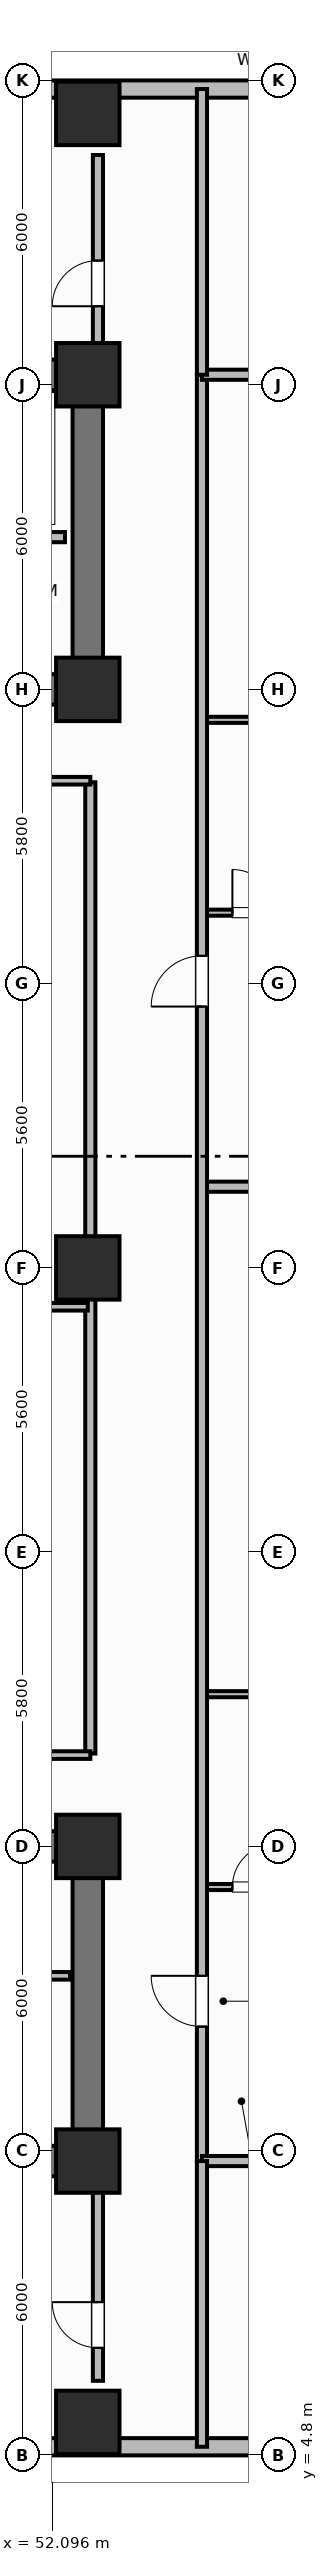
"""IFC4 building model, lengths in metres.
Left out: names, types, materials, properties, quantities, classifications, styles, units other than length and angle.
Written with IfcOpenShell. Run it as: python <this file> out.ifc"""

import sys

from ifc_helpers import new_model, si_unit, direction, frame, frame_2d, origin, origin_2d, place, context, subcontext, project, spatial, rectangle, extrude, element, fill, save


model = new_model("IFC4")
c1 = context("Model", 3, precision=1e-05, world=origin(), true_north=direction((0.0, 1.0)))
c2 = subcontext(c1, "Body", "Model", "MODEL_VIEW")
j1 = project(units=[si_unit("LENGTHUNIT", "METRE"), si_unit("PLANEANGLEUNIT", "RADIAN")], contexts=[c1])
p1 = place(None, origin())
s1 = spatial("IfcSite", under=j1, at=p1, CompositionType="ELEMENT")
p2 = place(p1, origin())
s2 = spatial("IfcBuilding", under=s1, at=p2, CompositionType="ELEMENT")
p3 = place(p2, frame((0.0, 0.0, 51.0)))
s3 = spatial("IfcBuildingStorey", under=s2, at=p3, CompositionType="ELEMENT", Elevation=51.0)
p4 = place(p3, frame((52.8, 10.6, 0.0), z_axis=(0.0, 0.0, 1.0), x_axis=(-1.0, 0.0, 0.0)))
e1 = element("IfcWall", 1, at=p4, inside=s3, PredefinedType="SHEAR", context=c2, shape_type="SweptSolid", body=[
    extrude(rectangle(XDim=27.2, YDim=0.6, at=frame_2d((13.6, 0.0))), origin(), (0.0, 0.0, 1.0), 3.7),
])
p5 = place(p3, frame((52.8, 10.9, 0.0), z_axis=(0.0, 0.0, 1.0), x_axis=(0.0, 1.0, 0.0)))
e2 = element("IfcWall", 2, at=p5, inside=s3, PredefinedType="SHEAR", context=c2, shape_type="SweptSolid", body=[
    extrude(rectangle(XDim=5.6, YDim=0.6, at=frame_2d((2.8, 0.0))), origin(), (0.0, 0.0, 1.0), 3.7),
])
p6 = place(p3, frame((25.6, 16.8, 0.0), z_axis=(0.0, 0.0, 1.0), x_axis=(1.0, 0.0, 0.0)))
e3 = element("IfcWall", 3, at=p6, inside=s3, PredefinedType="SHEAR", context=c2, shape_type="SweptSolid", body=[
    extrude(rectangle(XDim=27.2, YDim=0.6, at=frame_2d((13.6, 0.0))), origin(), (0.0, 0.0, 1.0), 3.7),
])
p7 = place(p6, frame((1.8, 0.0, 0.0)))
e4 = element("IfcOpeningElement", 4, at=p7, cuts=e3, PredefinedType="OPENING", context=c2, shape_type="SweptSolid", body=[
    extrude(rectangle(XDim=1.1, YDim=2.15, at=frame_2d((0.55, 1.075))), frame((0.0, 0.31, 0.0), z_axis=(0.0, -1.0, 0.0), x_axis=(1.0, 0.0, 0.0)), (0.0, 0.0, 1.0), 0.62),
])
p8 = place(p6, frame((5.6, 0.0, 0.0)))
e5 = element("IfcOpeningElement", 5, at=p8, cuts=e3, PredefinedType="OPENING", context=c2, shape_type="SweptSolid", body=[
    extrude(rectangle(XDim=0.85, YDim=2.1, at=frame_2d((0.425, 1.05))), frame((0.0, 0.31, 0.0), z_axis=(0.0, -1.0, 0.0), x_axis=(1.0, 0.0, 0.0)), (0.0, 0.0, 1.0), 0.62),
])
p9 = place(p6, frame((13.0, 0.0, 0.0)))
e6 = element("IfcOpeningElement", 6, at=p9, cuts=e3, PredefinedType="OPENING", context=c2, shape_type="SweptSolid", body=[
    extrude(rectangle(XDim=1.2, YDim=2.15, at=frame_2d((0.6, 1.075))), frame((0.0, 0.31, 0.0), z_axis=(0.0, -1.0, 0.0), x_axis=(1.0, 0.0, 0.0)), (0.0, 0.0, 1.0), 0.62),
])
p10 = place(p6, frame((20.4, 0.0, 0.0)))
e7 = element("IfcOpeningElement", 7, at=p10, cuts=e3, PredefinedType="OPENING", context=c2, shape_type="SweptSolid", body=[
    extrude(rectangle(XDim=1.3, YDim=2.2, at=frame_2d((0.65, 1.1))), frame((0.0, 0.31, 0.0), z_axis=(0.0, -1.0, 0.0), x_axis=(1.0, 0.0, 0.0)), (0.0, 0.0, 1.0), 0.62),
])
p11 = place(p6, frame((24.65, 0.0, 0.0)))
e8 = element("IfcOpeningElement", 8, at=p11, cuts=e3, PredefinedType="OPENING", context=c2, shape_type="SweptSolid", body=[
    extrude(rectangle(XDim=0.85, YDim=2.1, at=frame_2d((0.425, 1.05))), frame((0.0, 0.31, 0.0), z_axis=(0.0, -1.0, 0.0), x_axis=(1.0, 0.0, 0.0)), (0.0, 0.0, 1.0), 0.62),
])
p12 = place(p3, frame((25.6, 45.8, 0.0), z_axis=(0.0, 0.0, 1.0), x_axis=(1.0, 0.0, 0.0)))
e9 = element("IfcWall", 9, at=p12, inside=s3, PredefinedType="SHEAR", context=c2, shape_type="SweptSolid", body=[
    extrude(rectangle(XDim=27.2, YDim=0.6, at=frame_2d((13.6, 0.0))), origin(), (0.0, 0.0, 1.0), 3.7),
])
p13 = place(p3, frame((52.8, 39.9, 0.0), z_axis=(0.0, 0.0, 1.0), x_axis=(0.0, 1.0, 0.0)))
e10 = element("IfcWall", 10, at=p13, inside=s3, PredefinedType="SHEAR", context=c2, shape_type="SweptSolid", body=[
    extrude(rectangle(XDim=5.6, YDim=0.6, at=frame_2d((2.8, 0.0))), origin(), (0.0, 0.0, 1.0), 3.7),
])
p14 = place(p3, frame((52.8, 39.6, 0.0), z_axis=(0.0, 0.0, 1.0), x_axis=(-1.0, 0.0, 0.0)))
e11 = element("IfcWall", 11, at=p14, inside=s3, PredefinedType="SHEAR", context=c2, shape_type="SweptSolid", body=[
    extrude(rectangle(XDim=27.2, YDim=0.6, at=frame_2d((13.6, 0.0))), origin(), (0.0, 0.0, 1.0), 3.7),
])
p15 = place(p14, frame((24.2, 0.0, 0.0)))
e12 = element("IfcOpeningElement", 12, at=p15, cuts=e11, PredefinedType="OPENING", context=c2, shape_type="SweptSolid", body=[
    extrude(rectangle(XDim=1.1, YDim=2.15, at=frame_2d((0.55, 1.075))), frame((0.0, 0.31, 0.0), z_axis=(0.0, -1.0, 0.0), x_axis=(1.0, 0.0, 0.0)), (0.0, 0.0, 1.0), 0.62),
])
p16 = place(p14, frame((20.55, 0.0, 0.0)))
e13 = element("IfcOpeningElement", 13, at=p16, cuts=e11, PredefinedType="OPENING", context=c2, shape_type="SweptSolid", body=[
    extrude(rectangle(XDim=0.95, YDim=2.1, at=frame_2d((0.475, 1.05))), frame((0.0, 0.31, 0.0), z_axis=(0.0, -1.0, 0.0), x_axis=(1.0, 0.0, 0.0)), (0.0, 0.0, 1.0), 0.62),
])
p17 = place(p14, frame((15.1, 0.0, 0.0)))
e14 = element("IfcOpeningElement", 14, at=p17, cuts=e11, PredefinedType="OPENING", context=c2, shape_type="SweptSolid", body=[
    extrude(rectangle(XDim=1.2, YDim=2.15, at=frame_2d((0.6, 1.075))), frame((0.0, 0.31, 0.0), z_axis=(0.0, -1.0, 0.0), x_axis=(1.0, 0.0, 0.0)), (0.0, 0.0, 1.0), 0.62),
])
p18 = place(p14, frame((11.6, 0.0, 0.0)))
e15 = element("IfcOpeningElement", 15, at=p18, cuts=e11, PredefinedType="OPENING", context=c2, shape_type="SweptSolid", body=[
    extrude(rectangle(XDim=0.9, YDim=2.1, at=frame_2d((0.45, 1.05))), frame((0.0, 0.31, 0.0), z_axis=(0.0, -1.0, 0.0), x_axis=(1.0, 0.0, 0.0)), (0.0, 0.0, 1.0), 0.62),
])
p19 = place(p14, frame((4.8, 0.0, 0.0)))
e16 = element("IfcOpeningElement", 16, at=p19, cuts=e11, PredefinedType="OPENING", context=c2, shape_type="SweptSolid", body=[
    extrude(rectangle(XDim=0.85, YDim=2.1, at=frame_2d((0.425, 1.05))), frame((0.0, 0.31, 0.0), z_axis=(0.0, -1.0, 0.0), x_axis=(1.0, 0.0, 0.0)), (0.0, 0.0, 1.0), 0.62),
])
p20 = place(p14, frame((1.9, 0.0, 0.0)))
e17 = element("IfcOpeningElement", 17, at=p20, cuts=e11, PredefinedType="OPENING", context=c2, shape_type="SweptSolid", body=[
    extrude(rectangle(XDim=0.85, YDim=2.1, at=frame_2d((0.425, 1.05))), frame((0.0, 0.31, 0.0), z_axis=(0.0, -1.0, 0.0), x_axis=(1.0, 0.0, 0.0)), (0.0, 0.0, 1.0), 0.62),
])
for number, where, z_axis, x_axis in (
    (18, (52.8, 10.6, 0.0), (0.0, 0.0, 1.0), (1.0, 0.0, 0.0)),
    (19, (52.8, 16.8, 0.0), (0.0, 0.0, 1.0), (1.0, 0.0, 0.0)),
    (20, (52.8, 39.6, 0.0), (0.0, 0.0, 1.0), (1.0, 0.0, 0.0)),
    (21, (52.8, 45.8, 0.0), (0.0, 0.0, 1.0), (1.0, 0.0, 0.0)),
    (22, (52.8, 28.2, 0.0), (0.0, 0.0, 1.0), (1.0, 0.0, 0.0)),
    (23, (52.8, 5.45, 0.0), (0.0, 0.0, 1.0), (1.0, 0.0, 0.0)),
    (24, (52.8, 50.95, 0.0), (0.0, 0.0, 1.0), (1.0, 0.0, 0.0)),
):
    element("IfcColumn", number, at=place(p3, frame(where, z_axis=z_axis, x_axis=x_axis)), inside=s3, PredefinedType="COLUMN", context=c2, shape_type="SweptSolid", body=[
        extrude(rectangle(XDim=1.25, YDim=1.25, at=origin_2d()), origin(), (0.0, 0.0, 1.0), 3.7),
    ])
p21 = place(p3, frame((42.4, 4.97, 0.0), z_axis=(0.0, 0.0, 1.0), x_axis=(1.0, 0.0, 0.0)))
e25 = element("IfcWall", 25, at=p21, inside=s3, PredefinedType="SOLIDWALL", context=c2, shape_type="SweptSolid", body=[
    extrude(rectangle(XDim=17.4, YDim=0.34, at=frame_2d((8.7, 0.0))), origin(), (0.0, 0.0, 1.0), 2.7),
])
p22 = place(p21, frame((4.78, 0.0, 0.73)))
e26 = element("IfcOpeningElement", 26, at=p22, cuts=e25, PredefinedType="OPENING", context=c2, shape_type="SweptSolid", body=[
    extrude(rectangle(XDim=1.4, YDim=1.85, at=frame_2d((0.7, 0.925))), frame((0.0, 0.18, 0.0), z_axis=(0.0, -1.0, 0.0), x_axis=(1.0, 0.0, 0.0)), (0.0, 0.0, 1.0), 0.36),
])
p23 = place(p21, frame((7.65, 0.0, 0.73)))
e27 = element("IfcOpeningElement", 27, at=p23, cuts=e25, PredefinedType="OPENING", context=c2, shape_type="SweptSolid", body=[
    extrude(rectangle(XDim=1.4, YDim=1.85, at=frame_2d((0.7, 0.925))), frame((0.0, 0.18, 0.0), z_axis=(0.0, -1.0, 0.0), x_axis=(1.0, 0.0, 0.0)), (0.0, 0.0, 1.0), 0.36),
])
p24 = place(p21, frame((14.44, 0.0, 0.73)))
e28 = element("IfcOpeningElement", 28, at=p24, cuts=e25, PredefinedType="OPENING", context=c2, shape_type="SweptSolid", body=[
    extrude(rectangle(XDim=1.4, YDim=1.85, at=frame_2d((0.7, 0.925))), frame((0.0, 0.18, 0.0), z_axis=(0.0, -1.0, 0.0), x_axis=(1.0, 0.0, 0.0)), (0.0, 0.0, 1.0), 0.36),
])
p25 = place(p3, frame((59.8, 51.43, 0.0), z_axis=(0.0, 0.0, 1.0), x_axis=(-1.0, 0.0, 0.0)))
e29 = element("IfcWall", 29, at=p25, inside=s3, PredefinedType="SOLIDWALL", context=c2, shape_type="SweptSolid", body=[
    extrude(rectangle(XDim=17.4, YDim=0.34, at=frame_2d((8.7, 0.0))), origin(), (0.0, 0.0, 1.0), 2.7),
])
p26 = place(p25, frame((1.762, 0.0, 0.73)))
e30 = element("IfcOpeningElement", 30, at=p26, cuts=e29, PredefinedType="OPENING", context=c2, shape_type="SweptSolid", body=[
    extrude(rectangle(XDim=1.8, YDim=1.85, at=frame_2d((0.9, 0.925))), frame((0.0, 0.18, 0.0), z_axis=(0.0, -1.0, 0.0), x_axis=(1.0, 0.0, 0.0)), (0.0, 0.0, 1.0), 0.36),
])
p27 = place(p25, frame((9.812, 0.0, 0.73)))
e31 = element("IfcOpeningElement", 31, at=p27, cuts=e29, PredefinedType="OPENING", context=c2, shape_type="SweptSolid", body=[
    extrude(rectangle(XDim=1.8, YDim=1.85, at=frame_2d((0.9, 0.925))), frame((0.0, 0.18, 0.0), z_axis=(0.0, -1.0, 0.0), x_axis=(1.0, 0.0, 0.0)), (0.0, 0.0, 1.0), 0.36),
])
p28 = place(p3, frame((49.6, 14.25, 0.0), z_axis=(0.0, 0.0, 1.0), x_axis=(1.0, 0.0, 0.0)))
e32 = element("IfcWall", 32, at=p28, inside=s3, PredefinedType="PARTITIONING", context=c2, shape_type="SweptSolid", body=[
    extrude(rectangle(XDim=2.85, YDim=0.15, at=frame_2d((1.425, 0.0))), origin(), (0.0, 0.0, 1.0), 2.53),
])
p29 = place(p28, frame((0.9, 0.0, 0.0)))
e33 = element("IfcOpeningElement", 33, at=p29, cuts=e32, PredefinedType="OPENING", context=c2, shape_type="SweptSolid", body=[
    extrude(rectangle(XDim=0.85, YDim=2.1, at=frame_2d((0.425, 1.05))), frame((0.0, 0.085, 0.0), z_axis=(0.0, -1.0, 0.0), x_axis=(1.0, 0.0, 0.0)), (0.0, 0.0, 1.0), 0.17),
])
p30 = place(p3, frame((52.35, 42.6, 0.0), z_axis=(0.0, 0.0, 1.0), x_axis=(-1.0, 0.0, 0.0)))
e34 = element("IfcWall", 34, at=p30, inside=s3, PredefinedType="PARTITIONING", context=c2, shape_type="SweptSolid", body=[
    extrude(rectangle(XDim=8.8, YDim=0.2, at=frame_2d((4.4, 0.0))), origin(), (0.0, 0.0, 1.0), 2.53),
])
p31 = place(p3, frame((52.85, 18.63, 0.0), z_axis=(0.0, 0.0, 1.0), x_axis=(0.0, 1.0, 0.0)))
e35 = element("IfcWall", 35, at=p31, inside=s3, PredefinedType="PARTITIONING", context=c2, shape_type="SweptSolid", body=[
    extrude(rectangle(XDim=19.14, YDim=0.2, at=frame_2d((9.57, 0.0))), origin(), (0.0, 0.0, 1.0), 2.53),
])
for number, where, z_axis, x_axis in (
    (36, (40.35, 18.6, 0.0), (0.0, 0.0, 1.0), (1.0, 0.0, 0.0)),
    (37, (40.35, 37.8, 0.0), (0.0, 0.0, 1.0), (1.0, 0.0, 0.0)),
):
    element("IfcWall", number, at=place(p3, frame(where, z_axis=z_axis, x_axis=x_axis)), inside=s3, PredefinedType="PARTITIONING", context=c2, shape_type="SweptSolid", body=[
        extrude(rectangle(XDim=12.5, YDim=0.15, at=frame_2d((6.25, 0.0))), origin(), (0.0, 0.0, 1.0), 2.53),
    ])
p32 = place(p3, frame((40.38, 27.434, 0.0), z_axis=(0.0, 0.0, 1.0), x_axis=(1.0, 0.0, 0.0)))
e38 = element("IfcWall", 38, at=p32, inside=s3, PredefinedType="PARTITIONING", context=c2, shape_type="SweptSolid", body=[
    extrude(rectangle(XDim=12.42, YDim=0.15, at=frame_2d((6.21, 0.0))), origin(), (0.0, 0.0, 1.0), 2.53),
])
p33 = place(p3, frame((55.05, 16.0, 0.0), z_axis=(0.0, 0.0, 1.0), x_axis=(1.0, 0.0, 0.0)))
e39 = element("IfcWall", 39, at=p33, inside=s3, PredefinedType="PARTITIONING", context=c2, shape_type="SweptSolid", body=[
    extrude(rectangle(XDim=2.25, YDim=0.12, at=frame_2d((1.125, 0.0))), origin(), (0.0, 0.0, 1.0), 2.53),
])
p34 = place(p33, frame((0.6, 0.0, 0.0)))
e40 = element("IfcOpeningElement", 40, at=p34, cuts=e39, PredefinedType="OPENING", context=c2, shape_type="SweptSolid", body=[
    extrude(rectangle(XDim=0.85, YDim=2.1, at=frame_2d((0.425, 1.05))), frame((0.0, 0.07, 0.0), z_axis=(0.0, -1.0, 0.0), x_axis=(1.0, 0.0, 0.0)), (0.0, 0.0, 1.0), 0.14),
])
p35 = place(p3, frame((55.05, 19.8, 0.0), z_axis=(0.0, 0.0, 1.0), x_axis=(1.0, 0.0, 0.0)))
e41 = element("IfcWall", 41, at=p35, inside=s3, PredefinedType="PARTITIONING", context=c2, shape_type="SweptSolid", body=[
    extrude(rectangle(XDim=2.25, YDim=0.12, at=frame_2d((1.125, 0.0))), origin(), (0.0, 0.0, 1.0), 2.53),
])
p36 = place(p3, frame((55.05, 29.8, 0.0), z_axis=(0.0, 0.0, 1.0), x_axis=(1.0, 0.0, 0.0)))
e42 = element("IfcWall", 42, at=p36, inside=s3, PredefinedType="PARTITIONING", context=c2, shape_type="SweptSolid", body=[
    extrude(rectangle(XDim=8.066, YDim=0.2, at=frame_2d((4.033, 0.0))), origin(), (0.0, 0.0, 1.0), 2.53),
])
p37 = place(p3, frame((55.05, 35.2, 0.0), z_axis=(0.0, 0.0, 1.0), x_axis=(1.0, 0.0, 0.0)))
e43 = element("IfcWall", 43, at=p37, inside=s3, PredefinedType="PARTITIONING", context=c2, shape_type="SweptSolid", body=[
    extrude(rectangle(XDim=2.25, YDim=0.12, at=frame_2d((1.125, 0.0))), origin(), (0.0, 0.0, 1.0), 2.53),
])
p38 = place(p37, frame((0.6, 0.0, 0.0)))
e44 = element("IfcOpeningElement", 44, at=p38, cuts=e43, PredefinedType="OPENING", context=c2, shape_type="SweptSolid", body=[
    extrude(rectangle(XDim=0.85, YDim=2.1, at=frame_2d((0.425, 1.05))), frame((0.0, 0.07, 0.0), z_axis=(0.0, -1.0, 0.0), x_axis=(1.0, 0.0, 0.0)), (0.0, 0.0, 1.0), 0.14),
])
p39 = place(p3, frame((55.05, 39.0, 0.0), z_axis=(0.0, 0.0, 1.0), x_axis=(1.0, 0.0, 0.0)))
e45 = element("IfcWall", 45, at=p39, inside=s3, PredefinedType="PARTITIONING", context=c2, shape_type="SweptSolid", body=[
    extrude(rectangle(XDim=2.25, YDim=0.12, at=frame_2d((1.125, 0.0))), origin(), (0.0, 0.0, 1.0), 2.53),
])
p40 = place(p3, frame((55.05, 10.6, 0.0), z_axis=(0.0, 0.0, 1.0), x_axis=(0.0, 1.0, 0.0)))
e46 = element("IfcWall", 46, at=p40, inside=s3, PredefinedType="PARTITIONING", context=c2, shape_type="SweptSolid", body=[
    extrude(rectangle(XDim=35.2, YDim=0.2, at=frame_2d((17.6, 0.0))), origin(), (0.0, 0.0, 1.0), 2.53),
])
p41 = place(p40, frame((2.65, 0.0, 0.0)))
e47 = element("IfcOpeningElement", 47, at=p41, cuts=e46, PredefinedType="OPENING", context=c2, shape_type="SweptSolid", body=[
    extrude(rectangle(XDim=1.0, YDim=2.15, at=frame_2d((0.5, 1.075))), frame((0.0, 0.11, 0.0), z_axis=(0.0, -1.0, 0.0), x_axis=(1.0, 0.0, 0.0)), (0.0, 0.0, 1.0), 0.22),
])
p42 = place(p40, frame((22.75, 0.0, 0.0)))
e48 = element("IfcOpeningElement", 48, at=p42, cuts=e46, PredefinedType="OPENING", context=c2, shape_type="SweptSolid", body=[
    extrude(rectangle(XDim=1.0, YDim=2.15, at=frame_2d((0.5, 1.075))), frame((0.0, 0.11, 0.0), z_axis=(0.0, -1.0, 0.0), x_axis=(1.0, 0.0, 0.0)), (0.0, 0.0, 1.0), 0.22),
])
for number, where, z_axis, x_axis in (
    (49, (55.05, 10.6, 0.0), (0.0, 0.0, 1.0), (1.0, 0.0, 0.0)),
    (50, (55.05, 45.8, 0.0), (0.0, 0.0, 1.0), (1.0, 0.0, 0.0)),
):
    element("IfcWall", number, at=place(p3, frame(where, z_axis=z_axis, x_axis=x_axis)), inside=s3, PredefinedType="PARTITIONING", context=c2, shape_type="SweptSolid", body=[
        extrude(rectangle(XDim=8.36, YDim=0.2, at=frame_2d((4.18, 0.0))), origin(), (0.0, 0.0, 1.0), 2.53),
    ])
p43 = place(p3, frame((55.05, 4.97, 0.0), z_axis=(0.0, 0.0, 1.0), x_axis=(0.0, 1.0, 0.0)))
e51 = element("IfcWall", 51, at=p43, inside=s3, PredefinedType="PARTITIONING", context=c2, shape_type="SweptSolid", body=[
    extrude(rectangle(XDim=5.63, YDim=0.2, at=frame_2d((2.815, 0.0))), origin(), (0.0, 0.0, 1.0), 2.53),
])
p44 = place(p3, frame((55.05, 45.8, 0.0), z_axis=(0.0, 0.0, 1.0), x_axis=(0.0, 1.0, 0.0)))
e52 = element("IfcWall", 52, at=p44, inside=s3, PredefinedType="PARTITIONING", context=c2, shape_type="SweptSolid", body=[
    extrude(rectangle(XDim=5.63, YDim=0.2, at=frame_2d((2.815, 0.0))), origin(), (0.0, 0.0, 1.0), 2.53),
])
p45 = place(p3, frame((53.0, 6.27, 0.0), z_axis=(0.0, 0.0, 1.0), x_axis=(0.0, 1.0, 0.0)))
e53 = element("IfcWall", 53, at=p45, inside=s3, PredefinedType="PARTITIONING", context=c2, shape_type="SweptSolid", body=[
    extrude(rectangle(XDim=4.03, YDim=0.2, at=frame_2d((2.015, 0.0))), origin(), (0.0, 0.0, 1.0), 2.53),
])
p46 = place(p45, frame((0.65, 0.0, 0.0)))
e54 = element("IfcOpeningElement", 54, at=p46, cuts=e53, PredefinedType="OPENING", context=c2, shape_type="SweptSolid", body=[
    extrude(rectangle(XDim=0.9, YDim=2.1, at=frame_2d((0.45, 1.05))), frame((0.0, 0.11, 0.0), z_axis=(0.0, -1.0, 0.0), x_axis=(1.0, 0.0, 0.0)), (0.0, 0.0, 1.0), 0.22),
])
p47 = place(p3, frame((53.0, 46.1, 0.0), z_axis=(0.0, 0.0, 1.0), x_axis=(0.0, 1.0, 0.0)))
e55 = element("IfcWall", 55, at=p47, inside=s3, PredefinedType="PARTITIONING", context=c2, shape_type="SweptSolid", body=[
    extrude(rectangle(XDim=4.03, YDim=0.2, at=frame_2d((2.015, 0.0))), origin(), (0.0, 0.0, 1.0), 2.53),
])
p48 = place(p47, frame((1.05, 0.0, 0.0)))
e56 = element("IfcOpeningElement", 56, at=p48, cuts=e55, PredefinedType="OPENING", context=c2, shape_type="SweptSolid", body=[
    extrude(rectangle(XDim=0.9, YDim=2.1, at=frame_2d((0.45, 1.05))), frame((0.0, 0.11, 0.0), z_axis=(0.0, -1.0, 0.0), x_axis=(1.0, 0.0, 0.0)), (0.0, 0.0, 1.0), 0.22),
])
p49 = place(p34, origin())
e57 = element("IfcDoor", 57, at=p49, inside=s3, OperationType="SINGLE_SWING_RIGHT", PredefinedType="DOOR", context=c2, shape_type="SweptSolid", body=[
    extrude(rectangle(XDim=0.85, YDim=2.1, at=frame_2d((0.425, 1.05))), frame((0.0, 0.025, 0.0), z_axis=(0.0, -1.0, 0.0), x_axis=(1.0, 0.0, 0.0)), (0.0, 0.0, 1.0), 0.05),
])
fill(e40, e57)
p50 = place(p38, origin())
e58 = element("IfcDoor", 58, at=p50, inside=s3, OperationType="SINGLE_SWING_LEFT", PredefinedType="DOOR", context=c2, shape_type="SweptSolid", body=[
    extrude(rectangle(XDim=0.85, YDim=2.1, at=frame_2d((0.425, 1.05))), frame((0.0, 0.025, 0.0), z_axis=(0.0, -1.0, 0.0), x_axis=(1.0, 0.0, 0.0)), (0.0, 0.0, 1.0), 0.05),
])
fill(e44, e58)
p51 = place(p41, origin())
e59 = element("IfcDoor", 59, at=p51, inside=s3, OperationType="SINGLE_SWING_RIGHT", PredefinedType="DOOR", context=c2, shape_type="SweptSolid", body=[
    extrude(rectangle(XDim=1.0, YDim=2.15, at=frame_2d((0.5, 1.075))), frame((0.0, 0.025, 0.0), z_axis=(0.0, -1.0, 0.0), x_axis=(1.0, 0.0, 0.0)), (0.0, 0.0, 1.0), 0.05),
])
fill(e47, e59)
p52 = place(p42, origin())
e60 = element("IfcDoor", 60, at=p52, inside=s3, OperationType="SINGLE_SWING_LEFT", PredefinedType="DOOR", context=c2, shape_type="SweptSolid", body=[
    extrude(rectangle(XDim=1.0, YDim=2.15, at=frame_2d((0.5, 1.075))), frame((0.0, 0.025, 0.0), z_axis=(0.0, -1.0, 0.0), x_axis=(1.0, 0.0, 0.0)), (0.0, 0.0, 1.0), 0.05),
])
fill(e48, e60)
p53 = place(p46, origin())
e61 = element("IfcDoor", 61, at=p53, inside=s3, OperationType="SINGLE_SWING_RIGHT", PredefinedType="DOOR", context=c2, shape_type="SweptSolid", body=[
    extrude(rectangle(XDim=0.9, YDim=2.1, at=frame_2d((0.45, 1.05))), frame((0.0, 0.025, 0.0), z_axis=(0.0, -1.0, 0.0), x_axis=(1.0, 0.0, 0.0)), (0.0, 0.0, 1.0), 0.05),
])
fill(e54, e61)
p54 = place(p48, origin())
e62 = element("IfcDoor", 62, at=p54, inside=s3, OperationType="SINGLE_SWING_LEFT", PredefinedType="DOOR", context=c2, shape_type="SweptSolid", body=[
    extrude(rectangle(XDim=0.9, YDim=2.1, at=frame_2d((0.45, 1.05))), frame((0.0, 0.025, 0.0), z_axis=(0.0, -1.0, 0.0), x_axis=(1.0, 0.0, 0.0)), (0.0, 0.0, 1.0), 0.05),
])
fill(e56, e62)
save(model, sys.argv[1])
